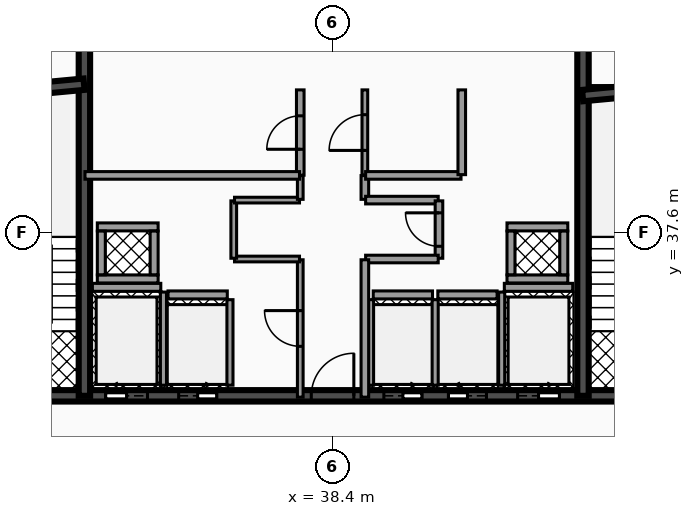
"""IFC4 building model, lengths in metres.
Left out: names, types, materials, properties, quantities, classifications, styles, units other than length and angle.
Written with IfcOpenShell. Run it as: python <this file> out.ifc"""

import sys

from ifc_helpers import new_model, si_unit, direction, frame, frame_2d, origin, place, context, subcontext, project, spatial, rectangle, extrude, element, fill, save


model = new_model("IFC4")
c1 = context("Model", 3, precision=1e-05, world=origin(), true_north=direction((0.0, 1.0)))
c2 = subcontext(c1, "Body", "Model", "MODEL_VIEW")
j1 = project(units=[si_unit("LENGTHUNIT", "METRE"), si_unit("PLANEANGLEUNIT", "RADIAN")], contexts=[c1])
p1 = place(None, origin())
s1 = spatial("IfcSite", under=j1, at=p1, CompositionType="ELEMENT")
p2 = place(p1, origin())
s2 = spatial("IfcBuilding", under=s1, at=p2, CompositionType="ELEMENT")
p3 = place(p2, frame((0.0, 0.0, 212.16)))
s3 = spatial("IfcBuildingStorey", under=s2, at=p3, CompositionType="ELEMENT", Elevation=212.16)
p4 = place(p3, frame((28.5, 33.3, 0.0), z_axis=(0.0, 0.0, 1.0), x_axis=(1.0, 0.0, 0.0)))
e1 = element("IfcWall", 1, at=p4, inside=s3, PredefinedType="SHEAR", context=c2, shape_type="SweptSolid", body=[
    extrude(rectangle(XDim=19.86, YDim=0.3, at=frame_2d((9.93, 0.0))), origin(), (0.0, 0.0, 1.0), 3.18),
])
p5 = place(p4, frame((3.93, 0.0, 0.0)))
e2 = element("IfcOpeningElement", 2, at=p5, cuts=e1, PredefinedType="OPENING", context=c2, shape_type="SweptSolid", body=[
    extrude(rectangle(XDim=1.1, YDim=2.15, at=frame_2d((0.55, 1.075))), frame((0.0, 0.16, 0.0), z_axis=(0.0, -1.0, 0.0), x_axis=(1.0, 0.0, 0.0)), (0.0, 0.0, 1.0), 0.32),
])
p6 = place(p4, frame((14.77, 0.0, 0.0)))
e3 = element("IfcOpeningElement", 3, at=p6, cuts=e1, PredefinedType="OPENING", context=c2, shape_type="SweptSolid", body=[
    extrude(rectangle(XDim=1.1, YDim=2.15, at=frame_2d((0.55, 1.075))), frame((0.0, 0.16, 0.0), z_axis=(0.0, -1.0, 0.0), x_axis=(1.0, 0.0, 0.0)), (0.0, 0.0, 1.0), 0.32),
])
p7 = place(p4, frame((11.25, 0.0, 0.0)))
e4 = element("IfcOpeningElement", 4, at=p7, cuts=e1, PredefinedType="OPENING", context=c2, shape_type="SweptSolid", body=[
    extrude(rectangle(XDim=1.0, YDim=2.1, at=frame_2d((0.5, 1.05))), frame((0.0, 0.16, 0.0), z_axis=(0.0, -1.0, 0.0), x_axis=(1.0, 0.0, 0.0)), (0.0, 0.0, 1.0), 0.32),
])
p8 = place(p4, frame((12.95, 0.0, 0.0)))
e5 = element("IfcOpeningElement", 5, at=p8, cuts=e1, PredefinedType="OPENING", context=c2, shape_type="SweptSolid", body=[
    extrude(rectangle(XDim=1.0, YDim=2.1, at=frame_2d((0.5, 1.05))), frame((0.0, 0.16, 0.0), z_axis=(0.0, -1.0, 0.0), x_axis=(1.0, 0.0, 0.0)), (0.0, 0.0, 1.0), 0.32),
])
p9 = place(p4, frame((5.85, 0.0, 0.0)))
e6 = element("IfcOpeningElement", 6, at=p9, cuts=e1, PredefinedType="OPENING", context=c2, shape_type="SweptSolid", body=[
    extrude(rectangle(XDim=1.0, YDim=2.1, at=frame_2d((0.5, 1.05))), frame((0.0, 0.16, 0.0), z_axis=(0.0, -1.0, 0.0), x_axis=(1.0, 0.0, 0.0)), (0.0, 0.0, 1.0), 0.32),
])
p10 = place(p4, frame((1.21, 0.0, 0.0)))
e7 = element("IfcOpeningElement", 7, at=p10, cuts=e1, PredefinedType="OPENING", context=c2, shape_type="SweptSolid", body=[
    extrude(rectangle(XDim=1.1, YDim=2.2, at=frame_2d((0.55, 1.1))), frame((0.0, 0.16, 0.0), z_axis=(0.0, -1.0, 0.0), x_axis=(1.0, 0.0, 0.0)), (0.0, 0.0, 1.0), 0.32),
])
p11 = place(p4, frame((9.34, 0.0, 0.0)))
e8 = element("IfcOpeningElement", 8, at=p11, cuts=e1, PredefinedType="OPENING", context=c2, shape_type="SweptSolid", body=[
    extrude(rectangle(XDim=1.12, YDim=2.05, at=frame_2d((0.56, 1.025))), frame((0.0, 0.16, 0.0), z_axis=(0.0, -1.0, 0.0), x_axis=(1.0, 0.0, 0.0)), (0.0, 0.0, 1.0), 0.32),
])
p12 = place(p4, frame((17.55, 0.0, 0.0)))
e9 = element("IfcOpeningElement", 9, at=p12, cuts=e1, PredefinedType="OPENING", context=c2, shape_type="SweptSolid", body=[
    extrude(rectangle(XDim=1.1, YDim=2.2, at=frame_2d((0.55, 1.1))), frame((0.0, 0.16, 0.0), z_axis=(0.0, -1.0, 0.0), x_axis=(1.0, 0.0, 0.0)), (0.0, 0.0, 1.0), 0.32),
])
for number, where, z_axis, x_axis in (
    (10, (31.87, 33.3, 0.0), (0.0, 0.0, 1.0), (0.0, 1.0, 0.0)),
    (11, (44.99, 33.3, 0.0), (0.0, 0.0, 1.0), (0.0, 1.0, 0.0)),
):
    element("IfcWall", number, at=place(p3, frame(where, z_axis=z_axis, x_axis=x_axis)), inside=s3, PredefinedType="SHEAR", context=c2, shape_type="SweptSolid", body=[
        extrude(rectangle(XDim=10.1, YDim=0.3, at=frame_2d((5.05, 0.0))), origin(), (0.0, 0.0, 1.0), 3.18),
    ])
p13 = place(p3, frame((28.64, 41.2, 0.0), z_axis=(0.0, 0.0, 1.0), x_axis=(0.995687118776, 0.092774789157, 0.0)))
e12 = element("IfcWall", 12, at=p13, inside=s3, PredefinedType="SHEAR", context=c2, shape_type="SweptSolid", body=[
    extrude(rectangle(XDim=3.234, YDim=0.3, at=frame_2d((1.617, 0.0))), origin(), (0.0, 0.0, 1.0), 3.18),
])
p14 = place(p3, frame((44.98, 41.2, 0.0), z_axis=(0.0, 0.0, 1.0), x_axis=(0.995686468965, 0.09278176286, 0.0)))
e13 = element("IfcWall", 13, at=p14, inside=s3, PredefinedType="SHEAR", context=c2, shape_type="SweptSolid", body=[
    extrude(rectangle(XDim=3.234, YDim=0.3, at=frame_2d((1.617, 0.0))), origin(), (0.0, 0.0, 1.0), 3.18),
])
p15 = place(p3, frame((32.08, 36.155, 0.0), z_axis=(0.0, 0.0, 1.0), x_axis=(1.0, 0.0, 0.0)))
e14 = element("IfcWall", 14, at=p15, inside=s3, PredefinedType="SOLIDWALL", context=c2, shape_type="SweptSolid", body=[
    extrude(rectangle(XDim=1.8, YDim=0.21, at=frame_2d((0.9, 0.0))), origin(), (0.0, 0.0, 1.0), 3.18),
])
p16 = place(p3, frame((33.95, 33.58, 0.0), z_axis=(0.0, 0.0, 1.0), x_axis=(0.0, 1.0, 0.0)))
e15 = element("IfcWall", 15, at=p16, inside=s3, PredefinedType="SOLIDWALL", context=c2, shape_type="SweptSolid", body=[
    extrude(rectangle(XDim=2.45, YDim=0.16, at=frame_2d((1.225, 0.0))), origin(), (0.0, 0.0, 1.0), 3.18),
])
p17 = place(p3, frame((42.92, 36.155, 0.0), z_axis=(0.0, 0.0, 1.0), x_axis=(1.0, 0.0, 0.0)))
e16 = element("IfcWall", 16, at=p17, inside=s3, PredefinedType="SOLIDWALL", context=c2, shape_type="SweptSolid", body=[
    extrude(rectangle(XDim=1.8, YDim=0.21, at=frame_2d((0.9, 0.0))), origin(), (0.0, 0.0, 1.0), 3.18),
])
p18 = place(p3, frame((42.85, 33.58, 0.0), z_axis=(0.0, 0.0, 1.0), x_axis=(0.0, 1.0, 0.0)))
e17 = element("IfcWall", 17, at=p18, inside=s3, PredefinedType="SOLIDWALL", context=c2, shape_type="SweptSolid", body=[
    extrude(rectangle(XDim=2.45, YDim=0.16, at=frame_2d((1.225, 0.0))), origin(), (0.0, 0.0, 1.0), 3.18),
])
p19 = place(p3, frame((39.47, 35.955, 0.0), z_axis=(0.0, 0.0, 1.0), x_axis=(1.0, 0.0, 0.0)))
e18 = element("IfcWall", 18, at=p19, inside=s3, PredefinedType="SOLIDWALL", context=c2, shape_type="SweptSolid", body=[
    extrude(rectangle(XDim=1.56, YDim=0.21, at=frame_2d((0.78, 0.0))), origin(), (0.0, 0.0, 1.0), 3.18),
])
for number, where, z_axis, x_axis in (
    (19, (39.4, 33.58, 0.0), (0.0, 0.0, 1.0), (0.0, 1.0, 0.0)),
    (20, (41.1, 33.58, 0.0), (0.0, 0.0, 1.0), (0.0, 1.0, 0.0)),
):
    element("IfcWall", number, at=place(p3, frame(where, z_axis=z_axis, x_axis=x_axis)), inside=s3, PredefinedType="SOLIDWALL", context=c2, shape_type="SweptSolid", body=[
        extrude(rectangle(XDim=2.25, YDim=0.16, at=frame_2d((1.125, 0.0))), origin(), (0.0, 0.0, 1.0), 3.18),
    ])
p20 = place(p3, frame((41.17, 35.955, 0.0), z_axis=(0.0, 0.0, 1.0), x_axis=(1.0, 0.0, 0.0)))
e21 = element("IfcWall", 21, at=p20, inside=s3, PredefinedType="SOLIDWALL", context=c2, shape_type="SweptSolid", body=[
    extrude(rectangle(XDim=1.56, YDim=0.21, at=frame_2d((0.78, 0.0))), origin(), (0.0, 0.0, 1.0), 3.18),
])
p21 = place(p3, frame((34.07, 35.955, 0.0), z_axis=(0.0, 0.0, 1.0), x_axis=(1.0, 0.0, 0.0)))
e22 = element("IfcWall", 22, at=p21, inside=s3, PredefinedType="SOLIDWALL", context=c2, shape_type="SweptSolid", body=[
    extrude(rectangle(XDim=1.56, YDim=0.21, at=frame_2d((0.78, 0.0))), origin(), (0.0, 0.0, 1.0), 3.18),
])
p22 = place(p3, frame((35.7, 33.58, 0.0), z_axis=(0.0, 0.0, 1.0), x_axis=(0.0, 1.0, 0.0)))
e23 = element("IfcWall", 23, at=p22, inside=s3, PredefinedType="SOLIDWALL", context=c2, shape_type="SweptSolid", body=[
    extrude(rectangle(XDim=2.25, YDim=0.16, at=frame_2d((1.125, 0.0))), origin(), (0.0, 0.0, 1.0), 3.18),
])
for number, where, z_axis, x_axis in (
    (24, (32.21, 36.375, 0.0), (0.0, 0.0, 1.0), (1.0, 0.0, 0.0)),
    (25, (32.21, 37.745, 0.0), (0.0, 0.0, 1.0), (1.0, 0.0, 0.0)),
):
    element("IfcWall", number, at=place(p3, frame(where, z_axis=z_axis, x_axis=x_axis)), inside=s3, PredefinedType="SOLIDWALL", context=c2, shape_type="SweptSolid", body=[
        extrude(rectangle(XDim=1.6, YDim=0.21, at=frame_2d((0.8, 0.0))), origin(), (0.0, 0.0, 1.0), 3.18),
    ])
for number, where, z_axis, x_axis in (
    (26, (32.315, 36.485, 0.0), (0.0, 0.0, 1.0), (0.0, 1.0, 0.0)),
    (27, (33.705, 36.485, 0.0), (0.0, 0.0, 1.0), (0.0, 1.0, 0.0)),
):
    element("IfcWall", number, at=place(p3, frame(where, z_axis=z_axis, x_axis=x_axis)), inside=s3, PredefinedType="SOLIDWALL", context=c2, shape_type="SweptSolid", body=[
        extrude(rectangle(XDim=1.15, YDim=0.21, at=frame_2d((0.575, 0.0))), origin(), (0.0, 0.0, 1.0), 3.18),
    ])
for number, where, z_axis, x_axis in (
    (28, (42.99, 36.375, 0.0), (0.0, 0.0, 1.0), (1.0, 0.0, 0.0)),
    (29, (42.99, 37.745, 0.0), (0.0, 0.0, 1.0), (1.0, 0.0, 0.0)),
):
    element("IfcWall", number, at=place(p3, frame(where, z_axis=z_axis, x_axis=x_axis)), inside=s3, PredefinedType="SOLIDWALL", context=c2, shape_type="SweptSolid", body=[
        extrude(rectangle(XDim=1.6, YDim=0.21, at=frame_2d((0.8, 0.0))), origin(), (0.0, 0.0, 1.0), 3.18),
    ])
for number, where, z_axis, x_axis in (
    (30, (43.095, 36.485, 0.0), (0.0, 0.0, 1.0), (0.0, 1.0, 0.0)),
    (31, (44.485, 36.485, 0.0), (0.0, 0.0, 1.0), (0.0, 1.0, 0.0)),
):
    element("IfcWall", number, at=place(p3, frame(where, z_axis=z_axis, x_axis=x_axis)), inside=s3, PredefinedType="SOLIDWALL", context=c2, shape_type="SweptSolid", body=[
        extrude(rectangle(XDim=1.15, YDim=0.21, at=frame_2d((0.575, 0.0))), origin(), (0.0, 0.0, 1.0), 3.18),
    ])
p23 = place(p3, frame((37.55, 33.265, 0.0), z_axis=(0.0, 0.0, 1.0), x_axis=(0.0, 1.0, 0.0)))
e32 = element("IfcWall", 32, at=p23, inside=s3, PredefinedType="PARTITIONING", context=c2, shape_type="SweptSolid", body=[
    extrude(rectangle(XDim=3.615, YDim=0.15, at=frame_2d((1.808, 0.0))), origin(), (0.0, 0.0, 1.0), 2.235),
])
p24 = place(p23, frame((1.337, 0.0, 0.0)))
e33 = element("IfcOpeningElement", 33, at=p24, cuts=e32, PredefinedType="OPENING", context=c2, shape_type="SweptSolid", body=[
    extrude(rectangle(XDim=0.94, YDim=2.05, at=frame_2d((0.47, 1.025))), frame((0.0, 0.085, 0.0), z_axis=(0.0, -1.0, 0.0), x_axis=(1.0, 0.0, 0.0)), (0.0, 0.0, 1.0), 0.17),
])
p25 = place(p3, frame((35.82, 36.9, 0.0), z_axis=(0.0, 0.0, 1.0), x_axis=(1.0, 0.0, 0.0)))
e34 = element("IfcWall", 34, at=p25, inside=s3, PredefinedType="PARTITIONING", context=c2, shape_type="SweptSolid", body=[
    extrude(rectangle(XDim=1.71, YDim=0.15, at=frame_2d((0.855, 0.0))), origin(), (0.0, 0.0, 1.0), 2.235),
])
p26 = place(p3, frame((35.8, 36.92, 0.0), z_axis=(0.0, 0.0, 1.0), x_axis=(0.0, 1.0, 0.0)))
e35 = element("IfcWall", 35, at=p26, inside=s3, PredefinedType="PARTITIONING", context=c2, shape_type="SweptSolid", body=[
    extrude(rectangle(XDim=1.51, YDim=0.15, at=frame_2d((0.755, 0.0))), origin(), (0.0, 0.0, 1.0), 2.235),
])
p27 = place(p3, frame((35.82, 38.45, 0.0), z_axis=(0.0, 0.0, 1.0), x_axis=(1.0, 0.0, 0.0)))
e36 = element("IfcWall", 36, at=p27, inside=s3, PredefinedType="PARTITIONING", context=c2, shape_type="SweptSolid", body=[
    extrude(rectangle(XDim=1.71, YDim=0.15, at=frame_2d((0.855, 0.0))), origin(), (0.0, 0.0, 1.0), 2.235),
])
p28 = place(p3, frame((37.55, 38.47, 0.0), z_axis=(0.0, 0.0, 1.0), x_axis=(0.0, 1.0, 0.0)))
e37 = element("IfcWall", 37, at=p28, inside=s3, PredefinedType="PARTITIONING", context=c2, shape_type="SweptSolid", body=[
    extrude(rectangle(XDim=0.625, YDim=0.15, at=frame_2d((0.312, 0.0))), origin(), (0.0, 0.0, 1.0), 2.235),
])
p29 = place(p3, frame((37.55, 39.105, 0.0), z_axis=(0.0, 0.0, 1.0), x_axis=(0.0, 1.0, 0.0)))
e38 = element("IfcWall", 38, at=p29, inside=s3, PredefinedType="PARTITIONING", context=c2, shape_type="SweptSolid", body=[
    extrude(rectangle(XDim=2.245, YDim=0.2, at=frame_2d((1.123, 0.0))), origin(), (0.0, 0.0, 1.0), 2.235),
])
p30 = place(p29, frame((0.683, 0.0, 0.0)))
e39 = element("IfcOpeningElement", 39, at=p30, cuts=e38, PredefinedType="OPENING", context=c2, shape_type="SweptSolid", body=[
    extrude(rectangle(XDim=0.88, YDim=2.05, at=frame_2d((0.44, 1.025))), frame((0.0, 0.11, 0.0), z_axis=(0.0, -1.0, 0.0), x_axis=(1.0, 0.0, 0.0)), (0.0, 0.0, 1.0), 0.22),
])
p31 = place(p3, frame((39.25, 38.47, 0.0), z_axis=(0.0, 0.0, 1.0), x_axis=(0.0, 1.0, 0.0)))
e40 = element("IfcWall", 40, at=p31, inside=s3, PredefinedType="PARTITIONING", context=c2, shape_type="SweptSolid", body=[
    extrude(rectangle(XDim=0.625, YDim=0.2, at=frame_2d((0.312, 0.0))), origin(), (0.0, 0.0, 1.0), 2.235),
])
p32 = place(p3, frame((39.27, 38.45, 0.0), z_axis=(0.0, 0.0, 1.0), x_axis=(1.0, 0.0, 0.0)))
e41 = element("IfcWall", 41, at=p32, inside=s3, PredefinedType="PARTITIONING", context=c2, shape_type="SweptSolid", body=[
    extrude(rectangle(XDim=1.91, YDim=0.2, at=frame_2d((0.955, 0.0))), origin(), (0.0, 0.0, 1.0), 2.235),
])
p33 = place(p3, frame((41.2, 36.92, 0.0), z_axis=(0.0, 0.0, 1.0), x_axis=(0.0, 1.0, 0.0)))
e42 = element("IfcWall", 42, at=p33, inside=s3, PredefinedType="PARTITIONING", context=c2, shape_type="SweptSolid", body=[
    extrude(rectangle(XDim=1.51, YDim=0.2, at=frame_2d((0.755, 0.0))), origin(), (0.0, 0.0, 1.0), 2.235),
])
p34 = place(p33, frame((0.315, 0.0, 0.0)))
e43 = element("IfcOpeningElement", 43, at=p34, cuts=e42, PredefinedType="OPENING", context=c2, shape_type="SweptSolid", body=[
    extrude(rectangle(XDim=0.88, YDim=2.05, at=frame_2d((0.44, 1.025))), frame((0.0, 0.11, 0.0), z_axis=(0.0, -1.0, 0.0), x_axis=(1.0, 0.0, 0.0)), (0.0, 0.0, 1.0), 0.22),
])
p35 = place(p3, frame((39.27, 36.9, 0.0), z_axis=(0.0, 0.0, 1.0), x_axis=(1.0, 0.0, 0.0)))
e44 = element("IfcWall", 44, at=p35, inside=s3, PredefinedType="PARTITIONING", context=c2, shape_type="SweptSolid", body=[
    extrude(rectangle(XDim=1.91, YDim=0.2, at=frame_2d((0.955, 0.0))), origin(), (0.0, 0.0, 1.0), 2.235),
])
p36 = place(p3, frame((39.25, 33.265, 0.0), z_axis=(0.0, 0.0, 1.0), x_axis=(0.0, 1.0, 0.0)))
e45 = element("IfcWall", 45, at=p36, inside=s3, PredefinedType="PARTITIONING", context=c2, shape_type="SweptSolid", body=[
    extrude(rectangle(XDim=3.615, YDim=0.2, at=frame_2d((1.808, 0.0))), origin(), (0.0, 0.0, 1.0), 2.235),
])
p37 = place(p3, frame((39.25, 39.105, 0.0), z_axis=(0.0, 0.0, 1.0), x_axis=(0.0, 1.0, 0.0)))
e46 = element("IfcWall", 46, at=p37, inside=s3, PredefinedType="PARTITIONING", context=c2, shape_type="SweptSolid", body=[
    extrude(rectangle(XDim=2.245, YDim=0.15, at=frame_2d((1.123, 0.0))), origin(), (0.0, 0.0, 1.0), 2.235),
])
p38 = place(p37, frame((0.653, 0.0, 0.0)))
e47 = element("IfcOpeningElement", 47, at=p38, cuts=e46, PredefinedType="OPENING", context=c2, shape_type="SweptSolid", body=[
    extrude(rectangle(XDim=0.94, YDim=2.05, at=frame_2d((0.47, 1.025))), frame((0.0, 0.085, 0.0), z_axis=(0.0, -1.0, 0.0), x_axis=(1.0, 0.0, 0.0)), (0.0, 0.0, 1.0), 0.17),
])
p39 = place(p3, frame((31.885, 39.1, 0.0), z_axis=(0.0, 0.0, 1.0), x_axis=(1.0, 0.0, 0.0)))
e48 = element("IfcWall", 48, at=p39, inside=s3, PredefinedType="PARTITIONING", context=c2, shape_type="SweptSolid", body=[
    extrude(rectangle(XDim=5.645, YDim=0.2, at=frame_2d((2.823, 0.0))), origin(), (0.0, 0.0, 1.0), 2.235),
])
p40 = place(p3, frame((39.27, 39.1, 0.0), z_axis=(0.0, 0.0, 1.0), x_axis=(1.0, 0.0, 0.0)))
e49 = element("IfcWall", 49, at=p40, inside=s3, PredefinedType="PARTITIONING", context=c2, shape_type="SweptSolid", body=[
    extrude(rectangle(XDim=2.51, YDim=0.2, at=frame_2d((1.255, 0.0))), origin(), (0.0, 0.0, 1.0), 2.235),
])
p41 = place(p3, frame((41.8, 39.12, 0.0), z_axis=(0.0, 0.0, 1.0), x_axis=(0.0, 1.0, 0.0)))
e50 = element("IfcWall", 50, at=p41, inside=s3, PredefinedType="PARTITIONING", context=c2, shape_type="SweptSolid", body=[
    extrude(rectangle(XDim=2.23, YDim=0.2, at=frame_2d((1.115, 0.0))), origin(), (0.0, 0.0, 1.0), 2.235),
])
p42 = place(p5, origin())
e51 = element("IfcDoor", 51, at=p42, inside=s3, OperationType="SLIDING_TO_LEFT", PredefinedType="DOOR", context=c2, shape_type="SweptSolid", body=[
    extrude(rectangle(XDim=1.1, YDim=2.15, at=frame_2d((0.55, 1.075))), frame((0.0, 0.025, 0.0), z_axis=(0.0, -1.0, 0.0), x_axis=(1.0, 0.0, 0.0)), (0.0, 0.0, 1.0), 0.05),
])
fill(e2, e51)
p43 = place(p6, origin())
e52 = element("IfcDoor", 52, at=p43, inside=s3, OperationType="SLIDING_TO_RIGHT", PredefinedType="DOOR", context=c2, shape_type="SweptSolid", body=[
    extrude(rectangle(XDim=1.1, YDim=2.15, at=frame_2d((0.55, 1.075))), frame((0.0, 0.025, 0.0), z_axis=(0.0, -1.0, 0.0), x_axis=(1.0, 0.0, 0.0)), (0.0, 0.0, 1.0), 0.05),
])
fill(e3, e52)
p44 = place(p7, origin())
e53 = element("IfcDoor", 53, at=p44, inside=s3, OperationType="SLIDING_TO_RIGHT", PredefinedType="DOOR", context=c2, shape_type="SweptSolid", body=[
    extrude(rectangle(XDim=1.0, YDim=2.1, at=frame_2d((0.5, 1.05))), frame((0.0, 0.025, 0.0), z_axis=(0.0, -1.0, 0.0), x_axis=(1.0, 0.0, 0.0)), (0.0, 0.0, 1.0), 0.05),
])
fill(e4, e53)
p45 = place(p8, origin())
e54 = element("IfcDoor", 54, at=p45, inside=s3, OperationType="SLIDING_TO_LEFT", PredefinedType="DOOR", context=c2, shape_type="SweptSolid", body=[
    extrude(rectangle(XDim=1.0, YDim=2.1, at=frame_2d((0.5, 1.05))), frame((0.0, 0.025, 0.0), z_axis=(0.0, -1.0, 0.0), x_axis=(1.0, 0.0, 0.0)), (0.0, 0.0, 1.0), 0.05),
])
fill(e5, e54)
p46 = place(p9, origin())
e55 = element("IfcDoor", 55, at=p46, inside=s3, OperationType="SLIDING_TO_RIGHT", PredefinedType="DOOR", context=c2, shape_type="SweptSolid", body=[
    extrude(rectangle(XDim=1.0, YDim=2.1, at=frame_2d((0.5, 1.05))), frame((0.0, 0.025, 0.0), z_axis=(0.0, -1.0, 0.0), x_axis=(1.0, 0.0, 0.0)), (0.0, 0.0, 1.0), 0.05),
])
fill(e6, e55)
p47 = place(p11, origin())
e56 = element("IfcDoor", 56, at=p47, inside=s3, OperationType="SINGLE_SWING_RIGHT", PredefinedType="DOOR", context=c2, shape_type="SweptSolid", body=[
    extrude(rectangle(XDim=1.12, YDim=2.05, at=frame_2d((0.56, 1.025))), frame((0.0, 0.025, 0.0), z_axis=(0.0, -1.0, 0.0), x_axis=(1.0, 0.0, 0.0)), (0.0, 0.0, 1.0), 0.05),
])
fill(e8, e56)
p48 = place(p24, origin())
e57 = element("IfcDoor", 57, at=p48, inside=s3, OperationType="SINGLE_SWING_RIGHT", PredefinedType="DOOR", context=c2, shape_type="SweptSolid", body=[
    extrude(rectangle(XDim=0.94, YDim=2.05, at=frame_2d((0.47, 1.025))), frame((0.0, 0.025, 0.0), z_axis=(0.0, -1.0, 0.0), x_axis=(1.0, 0.0, 0.0)), (0.0, 0.0, 1.0), 0.05),
])
fill(e33, e57)
p49 = place(p30, origin())
e58 = element("IfcDoor", 58, at=p49, inside=s3, OperationType="SINGLE_SWING_LEFT", PredefinedType="DOOR", context=c2, shape_type="SweptSolid", body=[
    extrude(rectangle(XDim=0.88, YDim=2.05, at=frame_2d((0.44, 1.025))), frame((0.0, 0.025, 0.0), z_axis=(0.0, -1.0, 0.0), x_axis=(1.0, 0.0, 0.0)), (0.0, 0.0, 1.0), 0.05),
])
fill(e39, e58)
p50 = place(p34, origin())
e59 = element("IfcDoor", 59, at=p50, inside=s3, OperationType="SINGLE_SWING_RIGHT", PredefinedType="DOOR", context=c2, shape_type="SweptSolid", body=[
    extrude(rectangle(XDim=0.88, YDim=2.05, at=frame_2d((0.44, 1.025))), frame((0.0, 0.025, 0.0), z_axis=(0.0, -1.0, 0.0), x_axis=(1.0, 0.0, 0.0)), (0.0, 0.0, 1.0), 0.05),
])
fill(e43, e59)
p51 = place(p38, origin())
e60 = element("IfcDoor", 60, at=p51, inside=s3, OperationType="SINGLE_SWING_LEFT", PredefinedType="DOOR", context=c2, shape_type="SweptSolid", body=[
    extrude(rectangle(XDim=0.94, YDim=2.05, at=frame_2d((0.47, 1.025))), frame((0.0, 0.025, 0.0), z_axis=(0.0, -1.0, 0.0), x_axis=(1.0, 0.0, 0.0)), (0.0, 0.0, 1.0), 0.05),
])
fill(e47, e60)
save(model, sys.argv[1])
